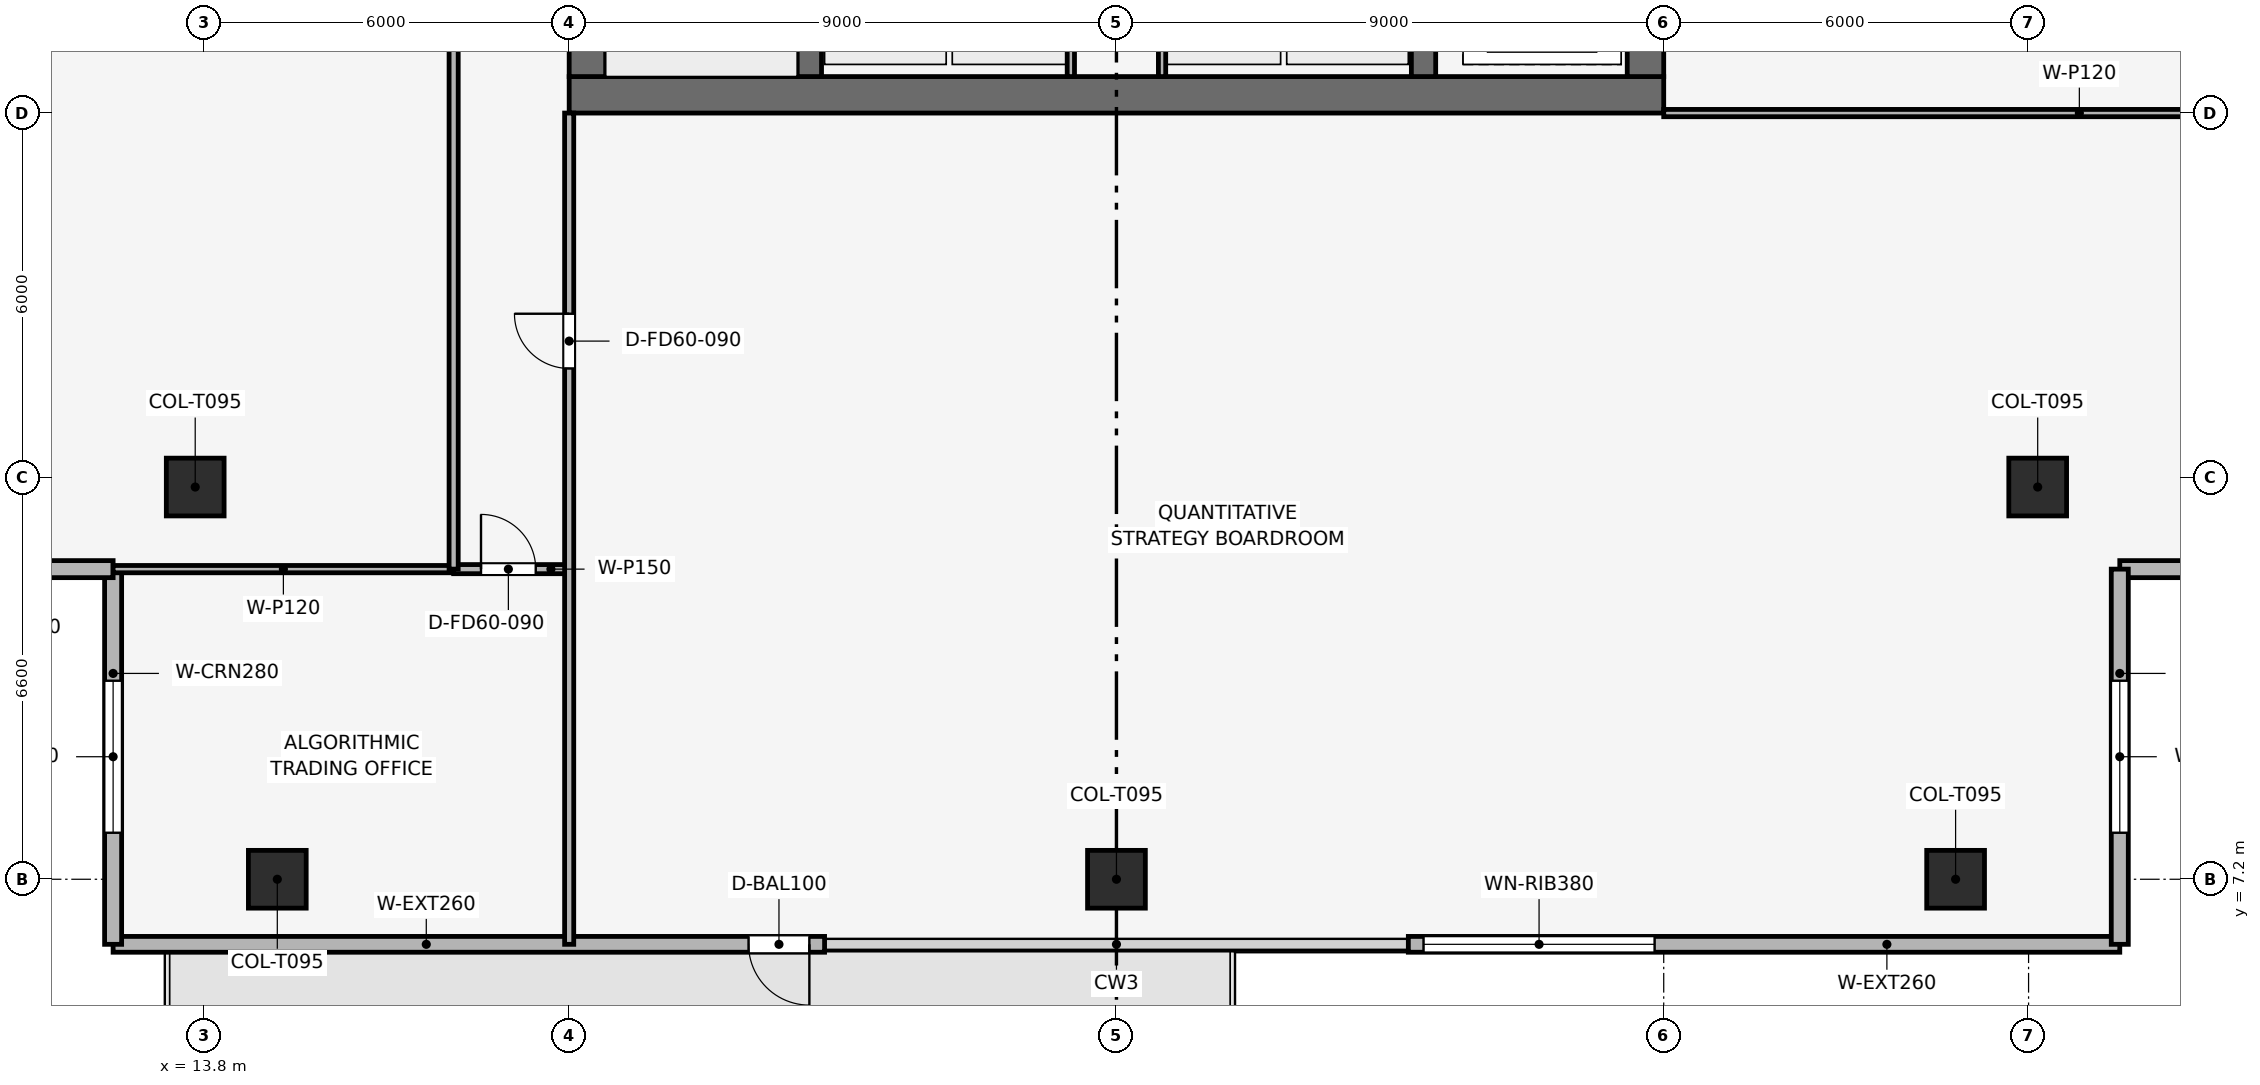
"""IFC4 building model, lengths in metres.
Left out: names, types, materials, properties, quantities, classifications, styles, units other than length and angle.
Written with IfcOpenShell. Run it as: python <this file> out.ifc"""

import sys

from ifc_helpers import new_model, si_unit, direction, frame, frame_2d, origin, origin_2d, place, context, subcontext, project, spatial, rectangle, extrude, element, fill, save


model = new_model("IFC4")
c1 = context("Model", 3, precision=1e-05, world=origin(), true_north=direction((0.0, 1.0)))
c2 = subcontext(c1, "Body", "Model", "MODEL_VIEW")
j1 = project(units=[si_unit("LENGTHUNIT", "METRE"), si_unit("PLANEANGLEUNIT", "RADIAN")], contexts=[c1])
p1 = place(None, origin())
s1 = spatial("IfcSite", under=j1, at=p1, CompositionType="ELEMENT")
p2 = place(p1, origin())
s2 = spatial("IfcBuilding", under=s1, at=p2, CompositionType="ELEMENT")
p3 = place(p2, frame((0.0, 0.0, 303.0)))
s3 = spatial("IfcBuildingStorey", under=s2, at=p3, CompositionType="ELEMENT", Elevation=303.0)
p4 = place(p3, frame((19.8, 20.1, 0.0), z_axis=(0.0, 0.0, 1.0), x_axis=(1.0, 0.0, 0.0)))
e1 = element("IfcWall", 1, at=p4, inside=s3, PredefinedType="SHEAR", context=c2, shape_type="SweptSolid", body=[
    extrude(rectangle(XDim=18.0, YDim=0.6, at=frame_2d((9.0, 0.0))), origin(), (0.0, 0.0, 1.0), 3.75),
])
p5 = place(p3, frame((20.1, 20.4, 0.0), z_axis=(0.0, 0.0, 1.0), x_axis=(0.0, 1.0, 0.0)))
e2 = element("IfcWall", 2, at=p5, inside=s3, PredefinedType="SHEAR", context=c2, shape_type="SweptSolid", body=[
    extrude(rectangle(XDim=16.8, YDim=0.6, at=frame_2d((8.4, 0.0))), origin(), (0.0, 0.0, 1.0), 3.75),
])
p6 = place(p5, frame((10.4, 0.0, 0.0)))
e3 = element("IfcOpeningElement", 3, at=p6, cuts=e2, PredefinedType="OPENING", context=c2, shape_type="SweptSolid", body=[
    extrude(rectangle(XDim=1.1, YDim=2.15, at=frame_2d((0.55, 1.075))), frame((0.0, 0.31, 0.0), z_axis=(0.0, -1.0, 0.0), x_axis=(1.0, 0.0, 0.0)), (0.0, 0.0, 1.0), 0.62),
])
p7 = place(p3, frame((37.5, 20.4, 0.0), z_axis=(0.0, 0.0, 1.0), x_axis=(0.0, 1.0, 0.0)))
e4 = element("IfcWall", 4, at=p7, inside=s3, PredefinedType="SHEAR", context=c2, shape_type="SweptSolid", body=[
    extrude(rectangle(XDim=16.8, YDim=0.6, at=frame_2d((8.4, 0.0))), origin(), (0.0, 0.0, 1.0), 3.75),
])
p8 = place(p7, frame((4.9, 0.0, 0.0)))
e5 = element("IfcOpeningElement", 5, at=p8, cuts=e4, PredefinedType="OPENING", context=c2, shape_type="SweptSolid", body=[
    extrude(rectangle(XDim=1.1, YDim=2.15, at=frame_2d((0.55, 1.075))), frame((0.0, 0.31, 0.0), z_axis=(0.0, -1.0, 0.0), x_axis=(1.0, 0.0, 0.0)), (0.0, 0.0, 1.0), 0.62),
])
for number, where, z_axis, x_axis in (
    (6, (23.75, 20.4, 0.0), (0.0, 0.0, 1.0), (0.0, 1.0, 0.0)),
    (7, (33.85, 20.4, 0.0), (0.0, 0.0, 1.0), (0.0, 1.0, 0.0)),
):
    element("IfcWall", number, at=place(p3, frame(where, z_axis=z_axis, x_axis=x_axis)), inside=s3, PredefinedType="SHEAR", context=c2, shape_type="SweptSolid", body=[
        extrude(rectangle(XDim=16.8, YDim=0.4, at=frame_2d((8.4, 0.0))), origin(), (0.0, 0.0, 1.0), 3.75),
    ])
for number, where, z_axis, x_axis in (
    (8, (15.0, 7.2, 0.003), (0.0, 0.0, 1.0), (1.0, 0.0, 0.0)),
    (9, (28.8, 7.2, 0.003), (0.0, 0.0, 1.0), (1.0, 0.0, 0.0)),
    (10, (42.6, 7.2, 0.003), (0.0, 0.0, 1.0), (1.0, 0.0, 0.0)),
    (11, (13.65, 13.65, 0.003), (0.0, 0.0, 1.0), (1.0, 0.0, 0.0)),
    (12, (43.95, 13.65, 0.003), (0.0, 0.0, 1.0), (1.0, 0.0, 0.0)),
):
    element("IfcColumn", number, at=place(p3, frame(where, z_axis=z_axis, x_axis=x_axis)), inside=s3, PredefinedType="COLUMN", context=c2, shape_type="SweptSolid", body=[
        extrude(rectangle(XDim=0.95, YDim=0.95, at=origin_2d()), origin(), (0.0, 0.0, 1.0), 3.504),
    ])
p9 = place(p3, frame((45.3, 6.13, 0.0), z_axis=(0.0, 0.0, 1.0), x_axis=(-1.0, 0.0, 0.0)))
e13 = element("IfcWall", 13, at=p9, inside=s3, PredefinedType="SOLIDWALL", context=c2, shape_type="SweptSolid", body=[
    extrude(rectangle(XDim=11.7, YDim=0.26, at=frame_2d((5.85, 0.0))), origin(), (0.0, 0.0, 1.0), 3.51),
])
p10 = place(p9, frame((7.65, 0.0, 0.9)))
e14 = element("IfcOpeningElement", 14, at=p10, cuts=e13, PredefinedType="OPENING", context=c2, shape_type="SweptSolid", body=[
    extrude(rectangle(XDim=3.8, YDim=1.9, at=frame_2d((1.9, 0.95))), frame((0.0, 0.14, 0.0), z_axis=(0.0, -1.0, 0.0), x_axis=(1.0, 0.0, 0.0)), (0.0, 0.0, 1.0), 0.28),
])
p11 = place(p3, frame((24.0, 6.13, 0.0), z_axis=(0.0, 0.0, 1.0), x_axis=(-1.0, 0.0, 0.0)))
e15 = element("IfcWall", 15, at=p11, inside=s3, PredefinedType="SOLIDWALL", context=c2, shape_type="SweptSolid", body=[
    extrude(rectangle(XDim=11.7, YDim=0.26, at=frame_2d((5.85, 0.0))), origin(), (0.0, 0.0, 1.0), 3.51),
])
p12 = place(p11, frame((0.25, 0.0, 0.0)))
e16 = element("IfcOpeningElement", 16, at=p12, cuts=e15, PredefinedType="OPENING", context=c2, shape_type="SweptSolid", body=[
    extrude(rectangle(XDim=1.0, YDim=2.2, at=frame_2d((0.5, 1.1))), frame((0.0, 0.14, 0.0), z_axis=(0.0, -1.0, 0.0), x_axis=(1.0, 0.0, 0.0)), (0.0, 0.0, 1.0), 0.28),
])
p13 = place(p3, frame((12.3, 6.13, 0.0), z_axis=(0.0, 0.0, 1.0), x_axis=(0.0, 1.0, 0.0)))
e17 = element("IfcWall", 17, at=p13, inside=s3, PredefinedType="SOLIDWALL", context=c2, shape_type="SweptSolid", body=[
    extrude(rectangle(XDim=6.17, YDim=0.28, at=frame_2d((3.085, 0.0))), origin(), (0.0, 0.0, 1.0), 3.51),
])
p14 = place(p13, frame((1.835, 0.0, 0.9)))
e18 = element("IfcOpeningElement", 18, at=p14, cuts=e17, PredefinedType="OPENING", context=c2, shape_type="SweptSolid", body=[
    extrude(rectangle(XDim=2.5, YDim=1.9, at=frame_2d((1.25, 0.95))), frame((0.0, 0.15, 0.0), z_axis=(0.0, -1.0, 0.0), x_axis=(1.0, 0.0, 0.0)), (0.0, 0.0, 1.0), 0.3),
])
p15 = place(p3, frame((12.3, 12.3, 0.0), z_axis=(0.0, 0.0, 1.0), x_axis=(-1.0, 0.0, 0.0)))
e19 = element("IfcWall", 19, at=p15, inside=s3, PredefinedType="SOLIDWALL", context=c2, shape_type="SweptSolid", body=[
    extrude(rectangle(XDim=6.17, YDim=0.28, at=frame_2d((3.085, 0.0))), origin(), (0.0, 0.0, 1.0), 3.51),
])
p16 = place(p15, frame((1.835, 0.0, 0.9)))
e20 = element("IfcOpeningElement", 20, at=p16, cuts=e19, PredefinedType="OPENING", context=c2, shape_type="SweptSolid", body=[
    extrude(rectangle(XDim=2.5, YDim=1.9, at=frame_2d((1.25, 0.95))), frame((0.0, 0.15, 0.0), z_axis=(0.0, -1.0, 0.0), x_axis=(1.0, 0.0, 0.0)), (0.0, 0.0, 1.0), 0.3),
])
p17 = place(p3, frame((51.47, 12.3, 0.0), z_axis=(0.0, 0.0, 1.0), x_axis=(-1.0, 0.0, 0.0)))
e21 = element("IfcWall", 21, at=p17, inside=s3, PredefinedType="SOLIDWALL", context=c2, shape_type="SweptSolid", body=[
    extrude(rectangle(XDim=6.17, YDim=0.28, at=frame_2d((3.085, 0.0))), origin(), (0.0, 0.0, 1.0), 3.51),
])
p18 = place(p17, frame((1.835, 0.0, 0.9)))
e22 = element("IfcOpeningElement", 22, at=p18, cuts=e21, PredefinedType="OPENING", context=c2, shape_type="SweptSolid", body=[
    extrude(rectangle(XDim=2.5, YDim=1.9, at=frame_2d((1.25, 0.95))), frame((0.0, 0.15, 0.0), z_axis=(0.0, -1.0, 0.0), x_axis=(1.0, 0.0, 0.0)), (0.0, 0.0, 1.0), 0.3),
])
p19 = place(p3, frame((45.3, 12.3, 0.0), z_axis=(0.0, 0.0, 1.0), x_axis=(0.0, -1.0, 0.0)))
e23 = element("IfcWall", 23, at=p19, inside=s3, PredefinedType="SOLIDWALL", context=c2, shape_type="SweptSolid", body=[
    extrude(rectangle(XDim=6.17, YDim=0.28, at=frame_2d((3.085, 0.0))), origin(), (0.0, 0.0, 1.0), 3.51),
])
p20 = place(p19, frame((1.835, 0.0, 0.9)))
e24 = element("IfcOpeningElement", 24, at=p20, cuts=e23, PredefinedType="OPENING", context=c2, shape_type="SweptSolid", body=[
    extrude(rectangle(XDim=2.5, YDim=1.9, at=frame_2d((1.25, 0.95))), frame((0.0, 0.15, 0.0), z_axis=(0.0, -1.0, 0.0), x_axis=(1.0, 0.0, 0.0)), (0.0, 0.0, 1.0), 0.3),
])
p21 = place(p3, frame((28.05, 20.4, 0.0), z_axis=(0.0, 0.0, 1.0), x_axis=(0.0, 1.0, 0.0)))
e25 = element("IfcWall", 25, at=p21, inside=s3, PredefinedType="PARTITIONING", context=c2, shape_type="SweptSolid", body=[
    extrude(rectangle(XDim=8.15, YDim=0.12, at=frame_2d((4.075, 0.0))), origin(), (0.0, 0.0, 1.0), 3.51),
])
p22 = place(p3, frame((29.55, 20.4, 0.0), z_axis=(0.0, 0.0, 1.0), x_axis=(0.0, 1.0, 0.0)))
e26 = element("IfcWall", 26, at=p22, inside=s3, PredefinedType="PARTITIONING", context=c2, shape_type="SweptSolid", body=[
    extrude(rectangle(XDim=2.75, YDim=0.12, at=frame_2d((1.375, 0.0))), origin(), (0.0, 0.0, 1.0), 3.51),
])
p23 = place(p3, frame((12.3, 12.3, 0.0), z_axis=(0.0, 0.0, 1.0), x_axis=(1.0, 0.0, 0.0)))
e27 = element("IfcWall", 27, at=p23, inside=s3, PredefinedType="PARTITIONING", context=c2, shape_type="SweptSolid", body=[
    extrude(rectangle(XDim=5.6, YDim=0.12, at=frame_2d((2.8, 0.0))), origin(), (0.0, 0.0, 1.0), 3.195),
])
p24 = place(p3, frame((17.9, 12.3, 0.0), z_axis=(0.0, 0.0, 1.0), x_axis=(1.0, 0.0, 0.0)))
e28 = element("IfcWall", 28, at=p24, inside=s3, PredefinedType="PARTITIONING", context=c2, shape_type="SweptSolid", body=[
    extrude(rectangle(XDim=1.9, YDim=0.15, at=frame_2d((0.95, 0.0))), origin(), (0.0, 0.0, 1.0), 3.51),
])
p25 = place(p24, frame((0.45, 0.0, 0.0)))
e29 = element("IfcOpeningElement", 29, at=p25, cuts=e28, PredefinedType="OPENING", context=c2, shape_type="SweptSolid", body=[
    extrude(rectangle(XDim=0.9, YDim=2.1, at=frame_2d((0.45, 1.05))), frame((0.0, 0.085, 0.0), z_axis=(0.0, -1.0, 0.0), x_axis=(1.0, 0.0, 0.0)), (0.0, 0.0, 1.0), 0.17),
])
p26 = place(p3, frame((19.8, 6.13, 0.0), z_axis=(0.0, 0.0, 1.0), x_axis=(0.0, 1.0, 0.0)))
e30 = element("IfcWall", 30, at=p26, inside=s3, PredefinedType="PARTITIONING", context=c2, shape_type="SweptSolid", body=[
    extrude(rectangle(XDim=13.67, YDim=0.15, at=frame_2d((6.835, 0.0))), origin(), (0.0, 0.0, 1.0), 3.095),
])
p27 = place(p26, frame((9.47, 0.0, 0.0)))
e31 = element("IfcOpeningElement", 31, at=p27, cuts=e30, PredefinedType="OPENING", context=c2, shape_type="SweptSolid", body=[
    extrude(rectangle(XDim=0.9, YDim=2.1, at=frame_2d((0.45, 1.05))), frame((0.0, 0.085, 0.0), z_axis=(0.0, -1.0, 0.0), x_axis=(1.0, 0.0, 0.0)), (0.0, 0.0, 1.0), 0.17),
])
p28 = place(p3, frame((37.8, 19.8, 0.0), z_axis=(0.0, 0.0, 1.0), x_axis=(1.0, 0.0, 0.0)))
e32 = element("IfcWall", 32, at=p28, inside=s3, PredefinedType="PARTITIONING", context=c2, shape_type="SweptSolid", body=[
    extrude(rectangle(XDim=13.67, YDim=0.12, at=frame_2d((6.835, 0.0))), origin(), (0.0, 0.0, 1.0), 3.095),
])
p29 = place(p3, frame((17.9, 12.3, 0.0), z_axis=(0.0, 0.0, 1.0), x_axis=(0.0, 1.0, 0.0)))
e33 = element("IfcWall", 33, at=p29, inside=s3, PredefinedType="PARTITIONING", context=c2, shape_type="SweptSolid", body=[
    extrude(rectangle(XDim=27.4, YDim=0.15, at=frame_2d((13.7, 0.0))), origin(), (0.0, 0.0, 1.0), 3.095),
])
p30 = place(p29, frame((13.25, 0.0, 0.0)))
e34 = element("IfcOpeningElement", 34, at=p30, cuts=e33, PredefinedType="OPENING", context=c2, shape_type="SweptSolid", body=[
    extrude(rectangle(XDim=0.9, YDim=2.1, at=frame_2d((0.45, 1.05))), frame((0.0, 0.085, 0.0), z_axis=(0.0, -1.0, 0.0), x_axis=(1.0, 0.0, 0.0)), (0.0, 0.0, 1.0), 0.17),
])
p31 = place(p12, origin())
e35 = element("IfcDoor", 35, at=p31, inside=s3, OperationType="SINGLE_SWING_LEFT", PredefinedType="DOOR", context=c2, shape_type="SweptSolid", body=[
    extrude(rectangle(XDim=1.0, YDim=2.2, at=frame_2d((0.5, 1.1))), frame((0.0, 0.025, 0.0), z_axis=(0.0, -1.0, 0.0), x_axis=(1.0, 0.0, 0.0)), (0.0, 0.0, 1.0), 0.05),
])
fill(e16, e35)
p32 = place(p10, origin())
e36 = element("IfcWindow", 36, at=p32, inside=s3, PartitioningType="SINGLE_PANEL", PredefinedType="WINDOW", context=c2, shape_type="SweptSolid", body=[
    extrude(rectangle(XDim=3.8, YDim=1.9, at=frame_2d((1.9, 0.95))), frame((0.0, 0.03, 0.0), z_axis=(0.0, -1.0, 0.0), x_axis=(1.0, 0.0, 0.0)), (0.0, 0.0, 1.0), 0.06),
])
fill(e14, e36)
p33 = place(p14, origin())
e37 = element("IfcWindow", 37, at=p33, inside=s3, PartitioningType="SINGLE_PANEL", PredefinedType="WINDOW", context=c2, shape_type="SweptSolid", body=[
    extrude(rectangle(XDim=2.5, YDim=1.9, at=frame_2d((1.25, 0.95))), frame((0.0, 0.03, 0.0), z_axis=(0.0, -1.0, 0.0), x_axis=(1.0, 0.0, 0.0)), (0.0, 0.0, 1.0), 0.06),
])
fill(e18, e37)
p34 = place(p20, origin())
e38 = element("IfcWindow", 38, at=p34, inside=s3, PartitioningType="SINGLE_PANEL", PredefinedType="WINDOW", context=c2, shape_type="SweptSolid", body=[
    extrude(rectangle(XDim=2.5, YDim=1.9, at=frame_2d((1.25, 0.95))), frame((0.0, 0.03, 0.0), z_axis=(0.0, -1.0, 0.0), x_axis=(1.0, 0.0, 0.0)), (0.0, 0.0, 1.0), 0.06),
])
fill(e24, e38)
p35 = place(p25, origin())
e39 = element("IfcDoor", 39, at=p35, inside=s3, OperationType="SINGLE_SWING_LEFT", PredefinedType="DOOR", context=c2, shape_type="SweptSolid", body=[
    extrude(rectangle(XDim=0.9, YDim=2.1, at=frame_2d((0.45, 1.05))), frame((0.0, 0.025, 0.0), z_axis=(0.0, -1.0, 0.0), x_axis=(1.0, 0.0, 0.0)), (0.0, 0.0, 1.0), 0.05),
])
fill(e29, e39)
p36 = place(p27, origin())
e40 = element("IfcDoor", 40, at=p36, inside=s3, OperationType="SINGLE_SWING_RIGHT", PredefinedType="DOOR", context=c2, shape_type="SweptSolid", body=[
    extrude(rectangle(XDim=0.9, YDim=2.1, at=frame_2d((0.45, 1.05))), frame((0.0, 0.025, 0.0), z_axis=(0.0, -1.0, 0.0), x_axis=(1.0, 0.0, 0.0)), (0.0, 0.0, 1.0), 0.05),
])
fill(e31, e40)
save(model, sys.argv[1])
